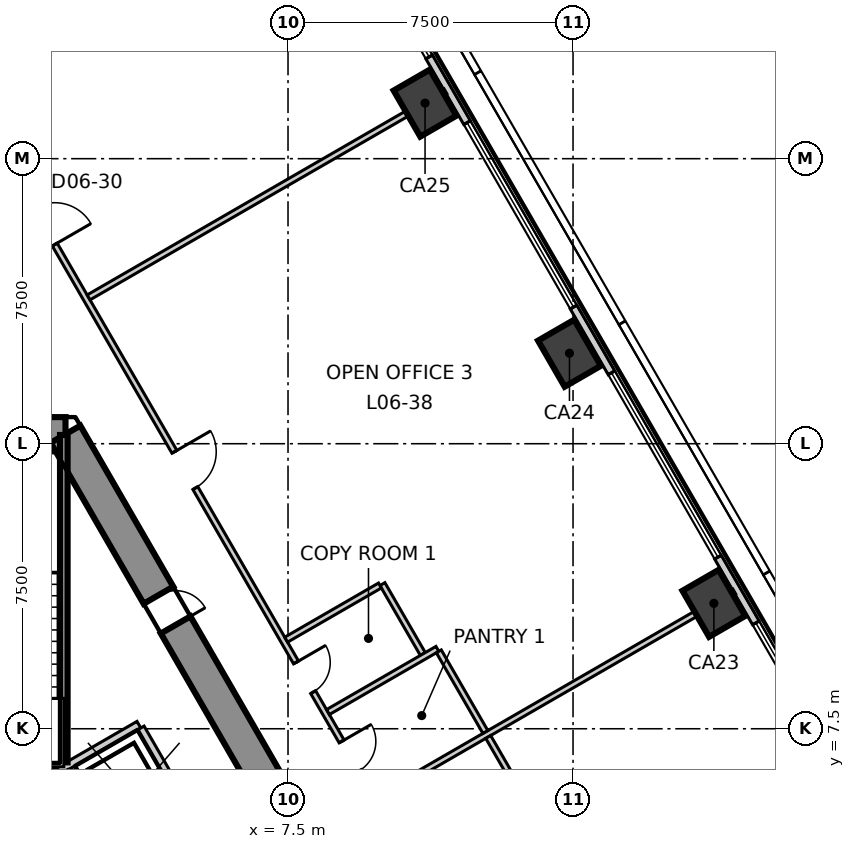
"""IFC4 building model, lengths in metres.
Left out: names, types, materials, properties, quantities, classifications, styles, units other than length and angle.
Written with IfcOpenShell. Run it as: python <this file> out.ifc"""

import sys

from ifc_helpers import new_model, si_unit, direction, frame, frame_2d, origin, origin_2d, place, context, subcontext, project, spatial, polyline, rectangle, outline, extrude, element, fill, save


model = new_model("IFC4")
c1 = context("Model", 3, precision=1e-05, world=origin(), true_north=direction((0.0, 1.0)))
c2 = subcontext(c1, "Body", "Model", "MODEL_VIEW")
j1 = project(units=[si_unit("LENGTHUNIT", "METRE"), si_unit("PLANEANGLEUNIT", "RADIAN")], contexts=[c1])
p1 = place(None, origin())
s1 = spatial("IfcSite", under=j1, at=p1, CompositionType="ELEMENT")
p2 = place(p1, origin())
s2 = spatial("IfcBuilding", under=s1, at=p2, CompositionType="ELEMENT")
p3 = place(p2, frame((0.0, 0.0, 35.3)))
s3 = spatial("IfcBuildingStorey", under=s2, at=p3, CompositionType="ELEMENT", Elevation=35.3)
p4 = place(p3, frame((1.645, 15.25, -0.3), z_axis=(0.0, 0.0, 1.0), x_axis=(-1.0, 0.0, 0.0)))
e1 = element("IfcWall", 1, at=p4, inside=s3, PredefinedType="SHEAR", context=c2, shape_type="SweptSolid", body=[
    extrude(outline(polyline([(-0.26, -0.45), (1.645, -0.45), (3.55, -0.45), (3.031, 0.45), (1.645, 0.45), (0.259, 0.45), (-0.26, -0.45)])), origin(), (0.0, 0.0, 1.0), 4.0),
])
p5 = place(p4, frame((0.945, 0.0, 0.3)))
e2 = element("IfcOpeningElement", 2, at=p5, cuts=e1, PredefinedType="OPENING", context=c2, shape_type="SweptSolid", body=[
    extrude(rectangle(XDim=1.4, YDim=2.1, at=frame_2d((0.7, 1.05))), frame((0.0, 0.46, 0.0), z_axis=(0.0, -1.0, 0.0), x_axis=(1.0, 0.0, 0.0)), (0.0, 0.0, 1.0), 0.92),
])
p6 = place(p3, frame((14.03, -6.2, -0.3), z_axis=(0.0, 0.0, 1.0), x_axis=(-0.500026485275, 0.866010111964, 0.0)))
e3 = element("IfcWall", 3, at=p6, inside=s3, PredefinedType="SHEAR", context=c2, shape_type="SweptSolid", body=[
    extrude(outline(polyline([(-0.26, -0.449), (1.685, -0.449), (3.63, -0.449), (5.576, -0.449), (7.521, -0.449), (9.466, -0.449), (11.411, -0.449), (13.357, -0.449), (15.302, -0.449), (17.247, -0.45), (19.192, -0.45), (21.138, -0.45), (23.083, -0.45), (25.028, -0.45), (24.509, 0.449), (22.644, 0.449), (20.778, 0.449), (18.913, 0.449), (17.048, 0.449), (15.182, 0.449), (13.317, 0.449), (11.452, 0.449), (9.587, 0.449), (7.721, 0.45), (5.856, 0.45), (3.991, 0.45), (2.125, 0.45), (0.26, 0.45), (-0.26, -0.449)])), origin(), (0.0, 0.0, 1.0), 4.0),
])
p7 = place(p6, frame((11.484, 0.0, 0.3)))
e4 = element("IfcOpeningElement", 4, at=p7, cuts=e3, PredefinedType="OPENING", context=c2, shape_type="SweptSolid", body=[
    extrude(rectangle(XDim=1.8, YDim=2.1, at=frame_2d((0.9, 1.05))), frame((0.0, 0.46, 0.0), z_axis=(0.0, -1.0, 0.0), x_axis=(1.0, 0.0, 0.0)), (0.0, 0.0, 1.0), 0.92),
])
p8 = place(p6, frame((18.976, 0.0, 0.3)))
e5 = element("IfcOpeningElement", 5, at=p8, cuts=e3, PredefinedType="OPENING", context=c2, shape_type="SweptSolid", body=[
    extrude(rectangle(XDim=0.9, YDim=2.1, at=frame_2d((0.45, 1.05))), frame((0.0, 0.46, 0.0), z_axis=(0.0, -1.0, 0.0), x_axis=(1.0, 0.0, 0.0)), (0.0, 0.0, 1.0), 0.92),
])
for number, where, z_axis, x_axis in (
    (6, (18.706, 10.8, -0.3), (0.0, 0.0, 1.0), (-0.5, 0.866, 0.0)),
    (7, (14.906, 17.381, -0.3), (0.0, 0.0, 1.0), (-0.5, 0.866, 0.0)),
    (8, (11.106, 23.962, -0.3), (0.0, 0.0, 1.0), (-0.5, 0.866, 0.0)),
):
    element("IfcColumn", number, at=place(p3, frame(where, z_axis=z_axis, x_axis=x_axis)), inside=s3, PredefinedType="COLUMN", context=c2, shape_type="SweptSolid", body=[
        extrude(rectangle(XDim=1.4, YDim=1.1, at=origin_2d()), origin(), (0.0, 0.0, 1.0), 4.0),
    ])
p9 = place(p3, frame((35.163, -16.303, 0.0), z_axis=(0.0, 0.0, 1.0), x_axis=(-0.500012207976, 0.866018355391, 0.0)))
e9 = element("IfcWall", 9, at=p9, inside=s3, PredefinedType="ELEMENTEDWALL", context=c2, shape_type="SweptSolid", body=[
    extrude(rectangle(XDim=63.381, YDim=0.2, at=frame_2d((31.69, 0.0))), origin(), (0.0, 0.0, 1.0), 3.7),
])
p10 = place(p9, frame((2.302, 0.0, 0.9)))
e10 = element("IfcOpeningElement", 10, at=p10, cuts=e9, PredefinedType="OPENING", context=c2, shape_type="SweptSolid", body=[
    extrude(rectangle(XDim=5.6, YDim=2.5, at=frame_2d((2.8, 1.25))), frame((0.0, 0.11, 0.0), z_axis=(0.0, -1.0, 0.0), x_axis=(1.0, 0.0, 0.0)), (0.0, 0.0, 1.0), 0.22),
])
p11 = place(p9, frame((9.902, 0.0, 0.9)))
e11 = element("IfcOpeningElement", 11, at=p11, cuts=e9, PredefinedType="OPENING", context=c2, shape_type="SweptSolid", body=[
    extrude(rectangle(XDim=5.6, YDim=2.5, at=frame_2d((2.8, 1.25))), frame((0.0, 0.11, 0.0), z_axis=(0.0, -1.0, 0.0), x_axis=(1.0, 0.0, 0.0)), (0.0, 0.0, 1.0), 0.22),
])
p12 = place(p9, frame((17.501, 0.0, 0.9)))
e12 = element("IfcOpeningElement", 12, at=p12, cuts=e9, PredefinedType="OPENING", context=c2, shape_type="SweptSolid", body=[
    extrude(rectangle(XDim=5.6, YDim=2.5, at=frame_2d((2.8, 1.25))), frame((0.0, 0.11, 0.0), z_axis=(0.0, -1.0, 0.0), x_axis=(1.0, 0.0, 0.0)), (0.0, 0.0, 1.0), 0.22),
])
p13 = place(p9, frame((25.101, 0.0, 0.9)))
e13 = element("IfcOpeningElement", 13, at=p13, cuts=e9, PredefinedType="OPENING", context=c2, shape_type="SweptSolid", body=[
    extrude(rectangle(XDim=5.6, YDim=2.5, at=frame_2d((2.8, 1.25))), frame((0.0, 0.11, 0.0), z_axis=(0.0, -1.0, 0.0), x_axis=(1.0, 0.0, 0.0)), (0.0, 0.0, 1.0), 0.22),
])
p14 = place(p9, frame((32.7, 0.0, 0.9)))
e14 = element("IfcOpeningElement", 14, at=p14, cuts=e9, PredefinedType="OPENING", context=c2, shape_type="SweptSolid", body=[
    extrude(rectangle(XDim=5.6, YDim=2.5, at=frame_2d((2.8, 1.25))), frame((0.0, 0.11, 0.0), z_axis=(0.0, -1.0, 0.0), x_axis=(1.0, 0.0, 0.0)), (0.0, 0.0, 1.0), 0.22),
])
p15 = place(p9, frame((40.299, 0.0, 0.9)))
e15 = element("IfcOpeningElement", 15, at=p15, cuts=e9, PredefinedType="OPENING", context=c2, shape_type="SweptSolid", body=[
    extrude(rectangle(XDim=5.6, YDim=2.5, at=frame_2d((2.8, 1.25))), frame((0.0, 0.11, 0.0), z_axis=(0.0, -1.0, 0.0), x_axis=(1.0, 0.0, 0.0)), (0.0, 0.0, 1.0), 0.22),
])
p16 = place(p9, frame((47.899, 0.0, 0.9)))
e16 = element("IfcOpeningElement", 16, at=p16, cuts=e9, PredefinedType="OPENING", context=c2, shape_type="SweptSolid", body=[
    extrude(rectangle(XDim=5.6, YDim=2.5, at=frame_2d((2.8, 1.25))), frame((0.0, 0.11, 0.0), z_axis=(0.0, -1.0, 0.0), x_axis=(1.0, 0.0, 0.0)), (0.0, 0.0, 1.0), 0.22),
])
p17 = place(p9, frame((55.498, 0.0, 0.9)))
e17 = element("IfcOpeningElement", 17, at=p17, cuts=e9, PredefinedType="OPENING", context=c2, shape_type="SweptSolid", body=[
    extrude(rectangle(XDim=5.6, YDim=2.5, at=frame_2d((2.8, 1.25))), frame((0.0, 0.11, 0.0), z_axis=(0.0, -1.0, 0.0), x_axis=(1.0, 0.0, 0.0)), (0.0, 0.0, 1.0), 0.22),
])
p18 = place(p3, frame((9.851, 5.687, 0.0), z_axis=(0.0, 0.0, 1.0), x_axis=(0.865997012005, 0.50004917278, 0.0)))
e18 = element("IfcWall", 18, at=p18, inside=s3, PredefinedType="PARTITIONING", context=c2, shape_type="SweptSolid", body=[
    extrude(rectangle(XDim=10.845, YDim=0.15, at=frame_2d((5.423, 0.0))), origin(), (0.0, 0.0, 1.0), 3.2),
])
p19 = place(p3, frame((0.075, 22.47, 0.0), z_axis=(0.0, 0.0, 1.0), x_axis=(0.500002280369, -0.866024087209, 0.0)))
e19 = element("IfcWall", 19, at=p19, inside=s3, PredefinedType="PARTITIONING", context=c2, shape_type="SweptSolid", body=[
    extrude(rectangle(XDim=38.844, YDim=0.15, at=frame_2d((19.422, 0.0))), origin(), (0.0, 0.0, 1.0), 3.7),
])
p20 = place(p19, frame((36.244, 0.0, 0.0)))
e20 = element("IfcOpeningElement", 20, at=p20, cuts=e19, PredefinedType="OPENING", context=c2, shape_type="SweptSolid", body=[
    extrude(rectangle(XDim=1.1, YDim=2.1, at=frame_2d((0.55, 1.05))), frame((0.0, 0.085, 0.0), z_axis=(0.0, -1.0, 0.0), x_axis=(1.0, 0.0, 0.0)), (0.0, 0.0, 1.0), 0.17),
])
p21 = place(p19, frame((26.472, 0.0, 0.0)))
e21 = element("IfcOpeningElement", 21, at=p21, cuts=e19, PredefinedType="OPENING", context=c2, shape_type="SweptSolid", body=[
    extrude(rectangle(XDim=1.1, YDim=2.1, at=frame_2d((0.55, 1.05))), frame((0.0, 0.085, 0.0), z_axis=(0.0, -1.0, 0.0), x_axis=(1.0, 0.0, 0.0)), (0.0, 0.0, 1.0), 0.17),
])
p22 = place(p19, frame((8.872, 0.0, 0.0)))
e22 = element("IfcOpeningElement", 22, at=p22, cuts=e19, PredefinedType="OPENING", context=c2, shape_type="SweptSolid", body=[
    extrude(rectangle(XDim=1.1, YDim=2.1, at=frame_2d((0.55, 1.05))), frame((0.0, 0.085, 0.0), z_axis=(0.0, -1.0, 0.0), x_axis=(1.0, 0.0, 0.0)), (0.0, 0.0, 1.0), 0.17),
])
p23 = place(p19, frame((17.672, 0.0, 0.0)))
e23 = element("IfcOpeningElement", 23, at=p23, cuts=e19, PredefinedType="OPENING", context=c2, shape_type="SweptSolid", body=[
    extrude(rectangle(XDim=0.9, YDim=2.1, at=frame_2d((0.45, 1.05))), frame((0.0, 0.085, 0.0), z_axis=(0.0, -1.0, 0.0), x_axis=(1.0, 0.0, 0.0)), (0.0, 0.0, 1.0), 0.17),
])
p24 = place(p19, frame((15.272, 0.0, 0.0)))
e24 = element("IfcOpeningElement", 24, at=p24, cuts=e19, PredefinedType="OPENING", context=c2, shape_type="SweptSolid", body=[
    extrude(rectangle(XDim=0.9, YDim=2.1, at=frame_2d((0.45, 1.05))), frame((0.0, 0.085, 0.0), z_axis=(0.0, -1.0, 0.0), x_axis=(1.0, 0.0, 0.0)), (0.0, 0.0, 1.0), 0.17),
])
p25 = place(p19, frame((1.473, 0.0, 0.0)))
e25 = element("IfcOpeningElement", 25, at=p25, cuts=e19, PredefinedType="OPENING", context=c2, shape_type="SweptSolid", body=[
    extrude(rectangle(XDim=1.1, YDim=2.1, at=frame_2d((0.55, 1.05))), frame((0.0, 0.085, 0.0), z_axis=(0.0, -1.0, 0.0), x_axis=(1.0, 0.0, 0.0)), (0.0, 0.0, 1.0), 0.17),
])
p26 = place(p3, frame((2.252, 18.85, 0.0), z_axis=(0.0, 0.0, 1.0), x_axis=(0.866028869058, 0.499993997921, 0.0)))
e26 = element("IfcWall", 26, at=p26, inside=s3, PredefinedType="PARTITIONING", context=c2, shape_type="SweptSolid", body=[
    extrude(rectangle(XDim=10.844, YDim=0.15, at=frame_2d((5.422, 0.0))), origin(), (0.0, 0.0, 1.0), 3.7),
])
p27 = place(p3, frame((9.984, 11.307, 0.0), z_axis=(0.0, 0.0, 1.0), x_axis=(0.500352247806, -0.86582193788, 0.0)))
e27 = element("IfcWall", 27, at=p27, inside=s3, PredefinedType="PARTITIONING", context=c2, shape_type="SweptSolid", body=[
    extrude(rectangle(XDim=2.125, YDim=0.15, at=frame_2d((1.062, 0.0))), origin(), (0.0, 0.0, 1.0), 3.7),
])
p28 = place(p3, frame((7.451, 9.844, 0.0), z_axis=(0.0, 0.0, 1.0), x_axis=(0.866004402611, 0.500036373335, 0.0)))
e28 = element("IfcWall", 28, at=p28, inside=s3, PredefinedType="PARTITIONING", context=c2, shape_type="SweptSolid", body=[
    extrude(rectangle(XDim=2.85, YDim=0.15, at=frame_2d((1.425, 0.0))), origin(), (0.0, 0.0, 1.0), 3.7),
])
p29 = place(p3, frame((8.551, 7.939, 0.0), z_axis=(0.0, 0.0, 1.0), x_axis=(0.865975293465, 0.500086783578, 0.0)))
e29 = element("IfcWall", 29, at=p29, inside=s3, PredefinedType="PARTITIONING", context=c2, shape_type="SweptSolid", body=[
    extrude(rectangle(XDim=3.326, YDim=0.15, at=frame_2d((1.663, 0.0))), origin(), (0.0, 0.0, 1.0), 3.7),
])
p30 = place(p3, frame((11.468, 9.537, 0.0), z_axis=(0.0, 0.0, 1.0), x_axis=(0.499975448907, -0.8660395779, 0.0)))
e30 = element("IfcWall", 30, at=p30, inside=s3, PredefinedType="PARTITIONING", context=c2, shape_type="SweptSolid", body=[
    extrude(rectangle(XDim=2.45, YDim=0.15, at=frame_2d((1.225, 0.0))), origin(), (0.0, 0.0, 1.0), 3.7),
])
p31 = place(p3, frame((12.768, 7.285, 0.0), z_axis=(0.0, 0.0, 1.0), x_axis=(0.500015945769, -0.866016197294, 0.0)))
e31 = element("IfcWall", 31, at=p31, inside=s3, PredefinedType="PARTITIONING", context=c2, shape_type="SweptSolid", body=[
    extrude(rectangle(XDim=15.049, YDim=0.15, at=frame_2d((7.525, 0.0))), origin(), (0.0, 0.0, 1.0), 3.7),
])
p32 = place(p31, frame((7.074, 0.0, 0.0)))
e32 = element("IfcOpeningElement", 32, at=p32, cuts=e31, PredefinedType="OPENING", context=c2, shape_type="SweptSolid", body=[
    extrude(rectangle(XDim=1.0, YDim=2.1, at=frame_2d((0.5, 1.05))), frame((0.0, 0.085, 0.0), z_axis=(0.0, -1.0, 0.0), x_axis=(1.0, 0.0, 0.0)), (0.0, 0.0, 1.0), 0.17),
])
p33 = place(p3, frame((-0.002, 5.541, 0.0), z_axis=(0.0, 0.0, 1.0), x_axis=(0.86600155993, 0.500041296494, 0.0)))
e33 = element("IfcWall", 33, at=p33, inside=s3, PredefinedType="SOLIDWALL", context=c2, shape_type="SweptSolid", body=[
    extrude(rectangle(XDim=4.132, YDim=0.2, at=frame_2d((2.066, 0.0))), origin(), (0.0, 0.0, 1.0), 3.7),
])
for number, where, z_axis, x_axis in (
    (34, (3.626, 7.52, 0.0), (0.0, 0.0, 1.0), (0.5, -0.866, 0.0)),
    (35, (1.807, 6.47, 0.0), (0.0, 0.0, 1.0), (0.5, -0.866, 0.0)),
):
    element("IfcWall", number, at=place(p3, frame(where, z_axis=z_axis, x_axis=x_axis)), inside=s3, PredefinedType="SOLIDWALL", context=c2, shape_type="SweptSolid", body=[
        extrude(rectangle(XDim=2.9, YDim=0.2, at=frame_2d((1.45, 0.0))), origin(), (0.0, 0.0, 1.0), 3.7),
    ])
p34 = place(p3, frame((1.6, 6.615, 0.0), z_axis=(0.0, 0.0, 1.0), x_axis=(0.0, 1.0, 0.0)))
e36 = element("IfcWall", 36, at=p34, inside=s3, PredefinedType="SOLIDWALL", context=c2, shape_type="SweptSolid", body=[
    extrude(rectangle(XDim=8.615, YDim=0.2, at=frame_2d((4.308, 0.0))), origin(), (0.0, 0.0, 1.0), 3.7),
])
p35 = place(p3, frame((-1.4, 6.5, 0.0), z_axis=(0.0, 0.0, 1.0), x_axis=(1.0, 0.0, 0.0)))
e37 = element("IfcWall", 37, at=p35, inside=s3, PredefinedType="SOLIDWALL", context=c2, shape_type="SweptSolid", body=[
    extrude(rectangle(XDim=2.8, YDim=0.2, at=frame_2d((1.4, 0.0))), origin(), (0.0, 0.0, 1.0), 3.7),
])
p36 = place(p13, origin())
e38 = element("IfcWindow", 38, at=p36, inside=s3, PartitioningType="SINGLE_PANEL", PredefinedType="WINDOW", context=c2, shape_type="SweptSolid", body=[
    extrude(rectangle(XDim=5.6, YDim=2.5, at=frame_2d((2.8, 1.25))), frame((0.0, 0.03, 0.0), z_axis=(0.0, -1.0, 0.0), x_axis=(1.0, 0.0, 0.0)), (0.0, 0.0, 1.0), 0.06),
])
fill(e13, e38)
p37 = place(p14, origin())
e39 = element("IfcWindow", 39, at=p37, inside=s3, PartitioningType="SINGLE_PANEL", PredefinedType="WINDOW", context=c2, shape_type="SweptSolid", body=[
    extrude(rectangle(XDim=5.6, YDim=2.5, at=frame_2d((2.8, 1.25))), frame((0.0, 0.03, 0.0), z_axis=(0.0, -1.0, 0.0), x_axis=(1.0, 0.0, 0.0)), (0.0, 0.0, 1.0), 0.06),
])
fill(e14, e39)
p38 = place(p15, origin())
e40 = element("IfcWindow", 40, at=p38, inside=s3, PartitioningType="SINGLE_PANEL", PredefinedType="WINDOW", context=c2, shape_type="SweptSolid", body=[
    extrude(rectangle(XDim=5.6, YDim=2.5, at=frame_2d((2.8, 1.25))), frame((0.0, 0.03, 0.0), z_axis=(0.0, -1.0, 0.0), x_axis=(1.0, 0.0, 0.0)), (0.0, 0.0, 1.0), 0.06),
])
fill(e15, e40)
p39 = place(p16, origin())
e41 = element("IfcWindow", 41, at=p39, inside=s3, PartitioningType="SINGLE_PANEL", PredefinedType="WINDOW", context=c2, shape_type="SweptSolid", body=[
    extrude(rectangle(XDim=5.6, YDim=2.5, at=frame_2d((2.8, 1.25))), frame((0.0, 0.03, 0.0), z_axis=(0.0, -1.0, 0.0), x_axis=(1.0, 0.0, 0.0)), (0.0, 0.0, 1.0), 0.06),
])
fill(e16, e41)
p40 = place(p22, origin())
e42 = element("IfcDoor", 42, at=p40, inside=s3, OperationType="SINGLE_SWING_RIGHT", PredefinedType="DOOR", context=c2, shape_type="SweptSolid", body=[
    extrude(rectangle(XDim=1.1, YDim=2.1, at=frame_2d((0.55, 1.05))), frame((0.0, 0.025, 0.0), z_axis=(0.0, -1.0, 0.0), x_axis=(1.0, 0.0, 0.0)), (0.0, 0.0, 1.0), 0.05),
])
fill(e22, e42)
p41 = place(p23, origin())
e43 = element("IfcDoor", 43, at=p41, inside=s3, OperationType="SINGLE_SWING_RIGHT", PredefinedType="DOOR", context=c2, shape_type="SweptSolid", body=[
    extrude(rectangle(XDim=0.9, YDim=2.1, at=frame_2d((0.45, 1.05))), frame((0.0, 0.025, 0.0), z_axis=(0.0, -1.0, 0.0), x_axis=(1.0, 0.0, 0.0)), (0.0, 0.0, 1.0), 0.05),
])
fill(e23, e43)
p42 = place(p24, origin())
e44 = element("IfcDoor", 44, at=p42, inside=s3, OperationType="SINGLE_SWING_RIGHT", PredefinedType="DOOR", context=c2, shape_type="SweptSolid", body=[
    extrude(rectangle(XDim=0.9, YDim=2.1, at=frame_2d((0.45, 1.05))), frame((0.0, 0.025, 0.0), z_axis=(0.0, -1.0, 0.0), x_axis=(1.0, 0.0, 0.0)), (0.0, 0.0, 1.0), 0.05),
])
fill(e24, e44)
p43 = place(p25, origin())
e45 = element("IfcDoor", 45, at=p43, inside=s3, OperationType="SINGLE_SWING_LEFT", PredefinedType="DOOR", context=c2, shape_type="SweptSolid", body=[
    extrude(rectangle(XDim=1.1, YDim=2.1, at=frame_2d((0.55, 1.05))), frame((0.0, 0.025, 0.0), z_axis=(0.0, -1.0, 0.0), x_axis=(1.0, 0.0, 0.0)), (0.0, 0.0, 1.0), 0.05),
])
fill(e25, e45)
p44 = place(p8, origin())
e46 = element("IfcDoor", 46, at=p44, inside=s3, OperationType="SINGLE_SWING_LEFT", PredefinedType="DOOR", context=c2, shape_type="SweptSolid", body=[
    extrude(rectangle(XDim=0.9, YDim=2.1, at=frame_2d((0.45, 1.05))), frame((0.0, 0.025, 0.0), z_axis=(0.0, -1.0, 0.0), x_axis=(1.0, 0.0, 0.0)), (0.0, 0.0, 1.0), 0.05),
])
fill(e5, e46)
save(model, sys.argv[1])
